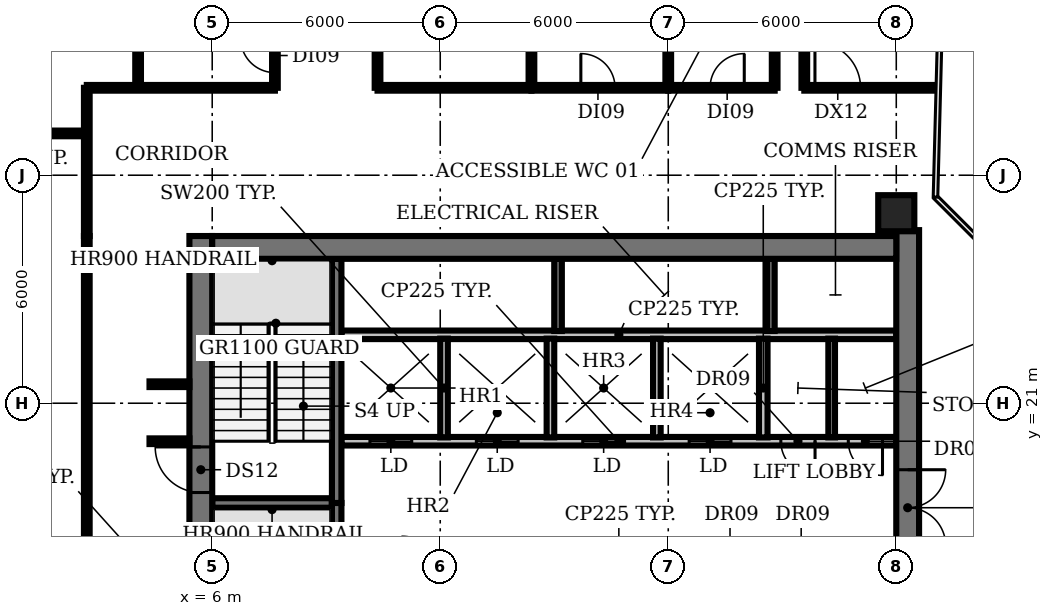
"""IFC4 building model, lengths in metres.
Left out: names, types, materials, properties, quantities, classifications, styles, units other than length and angle.
Written with IfcOpenShell. Run it as: python <this file> out.ifc"""

import sys

from ifc_helpers import new_model, si_unit, direction, frame, frame_2d, origin, origin_2d, place, context, subcontext, project, spatial, rectangle, circle, extrude, element, fill, save


model = new_model("IFC4")
c1 = context("Model", 3, precision=1e-05, world=origin(), true_north=direction((0.0, 1.0)))
c2 = subcontext(c1, "Body", "Model", "MODEL_VIEW")
j1 = project(units=[si_unit("LENGTHUNIT", "METRE"), si_unit("PLANEANGLEUNIT", "RADIAN")], contexts=[c1])
p1 = place(None, origin())
s1 = spatial("IfcSite", under=j1, at=p1, CompositionType="ELEMENT")
p2 = place(p1, origin())
s2 = spatial("IfcBuilding", under=s1, at=p2, CompositionType="ELEMENT")
p3 = place(p2, frame((0.0, 0.0, 163.4)))
s3 = spatial("IfcBuildingStorey", under=s2, at=p3, CompositionType="ELEMENT", Elevation=163.4)
p4 = place(p3, frame((24.0, 26.0, 0.0), z_axis=(0.0, 0.0, 1.0), x_axis=(1.0, 0.0, 0.0)))
e1 = element("IfcColumn", 1, at=p4, inside=s3, PredefinedType="COLUMN", context=c2, shape_type="SweptSolid", body=[
    extrude(circle(Radius=0.475, at=origin_2d()), origin(), (0.0, 0.0, 1.0), 3.85),
])
p5 = place(p3, frame((6.0, 18.375, 0.0), z_axis=(0.0, 0.0, 1.0), x_axis=(1.0, 0.0, 0.0)))
e2 = element("IfcWall", 2, at=p5, inside=s3, PredefinedType="SHEAR", context=c2, shape_type="SweptSolid", body=[
    extrude(rectangle(XDim=3.15, YDim=0.25, at=frame_2d((1.575, 0.0))), origin(), (0.0, 0.0, 1.0), 3.85),
])
p6 = place(p3, frame((24.0, 20.0, 0.0), z_axis=(0.0, 0.0, 1.0), x_axis=(-1.0, 0.0, 0.0)))
e3 = element("IfcWall", 3, at=p6, inside=s3, PredefinedType="PARTITIONING", context=c2, shape_type="SweptSolid", body=[
    extrude(rectangle(XDim=14.6, YDim=0.225, at=frame_2d((7.3, 0.0))), origin(), (0.0, 0.0, 1.0), 3.85),
])
p7 = place(p6, frame((12.75, 0.0, 0.0)))
e4 = element("IfcOpeningElement", 4, at=p7, cuts=e3, PredefinedType="OPENING", context=c2, shape_type="SweptSolid", body=[
    extrude(rectangle(XDim=1.1, YDim=2.1, at=frame_2d((0.55, 1.05))), frame((0.0, 0.123, 0.0), z_axis=(0.0, -1.0, 0.0), x_axis=(1.0, 0.0, 0.0)), (0.0, 0.0, 1.0), 0.245),
])
p8 = place(p6, frame((9.95, 0.0, 0.0)))
e5 = element("IfcOpeningElement", 5, at=p8, cuts=e3, PredefinedType="OPENING", context=c2, shape_type="SweptSolid", body=[
    extrude(rectangle(XDim=1.1, YDim=2.1, at=frame_2d((0.55, 1.05))), frame((0.0, 0.123, 0.0), z_axis=(0.0, -1.0, 0.0), x_axis=(1.0, 0.0, 0.0)), (0.0, 0.0, 1.0), 0.245),
])
p9 = place(p6, frame((7.15, 0.0, 0.0)))
e6 = element("IfcOpeningElement", 6, at=p9, cuts=e3, PredefinedType="OPENING", context=c2, shape_type="SweptSolid", body=[
    extrude(rectangle(XDim=1.1, YDim=2.1, at=frame_2d((0.55, 1.05))), frame((0.0, 0.123, 0.0), z_axis=(0.0, -1.0, 0.0), x_axis=(1.0, 0.0, 0.0)), (0.0, 0.0, 1.0), 0.245),
])
p10 = place(p6, frame((4.35, 0.0, 0.0)))
e7 = element("IfcOpeningElement", 7, at=p10, cuts=e3, PredefinedType="OPENING", context=c2, shape_type="SweptSolid", body=[
    extrude(rectangle(XDim=1.1, YDim=2.1, at=frame_2d((0.55, 1.05))), frame((0.0, 0.123, 0.0), z_axis=(0.0, -1.0, 0.0), x_axis=(1.0, 0.0, 0.0)), (0.0, 0.0, 1.0), 0.245),
])
p11 = place(p6, frame((2.137, 0.0, 0.0)))
e8 = element("IfcOpeningElement", 8, at=p11, cuts=e3, PredefinedType="OPENING", context=c2, shape_type="SweptSolid", body=[
    extrude(rectangle(XDim=0.9, YDim=2.1, at=frame_2d((0.45, 1.05))), frame((0.0, 0.123, 0.0), z_axis=(0.0, -1.0, 0.0), x_axis=(1.0, 0.0, 0.0)), (0.0, 0.0, 1.0), 0.245),
])
p12 = place(p6, frame((0.363, 0.0, 0.0)))
e9 = element("IfcOpeningElement", 9, at=p12, cuts=e3, PredefinedType="OPENING", context=c2, shape_type="SweptSolid", body=[
    extrude(rectangle(XDim=0.9, YDim=2.1, at=frame_2d((0.45, 1.05))), frame((0.0, 0.123, 0.0), z_axis=(0.0, -1.0, 0.0), x_axis=(1.0, 0.0, 0.0)), (0.0, 0.0, 1.0), 0.245),
])
p13 = place(p3, frame((9.4, 22.8, 0.0), z_axis=(0.0, 0.0, 1.0), x_axis=(1.0, 0.0, 0.0)))
e10 = element("IfcWall", 10, at=p13, inside=s3, PredefinedType="PARTITIONING", context=c2, shape_type="SweptSolid", body=[
    extrude(rectangle(XDim=14.6, YDim=0.225, at=frame_2d((7.3, 0.0))), origin(), (0.0, 0.0, 1.0), 3.85),
])
p14 = place(p3, frame((9.275, 18.375, 0.0), z_axis=(0.0, 0.0, 1.0), x_axis=(0.0, -1.0, 0.0)))
e11 = element("IfcWall", 11, at=p14, inside=s3, PredefinedType="SHEAR", context=c2, shape_type="SweptSolid", body=[
    extrude(rectangle(XDim=6.55, YDim=0.25, at=frame_2d((3.275, 0.0))), origin(), (0.0, 0.0, 1.0), 3.85),
])
p15 = place(p14, frame((5.075, 0.0, 0.0)))
e12 = element("IfcOpeningElement", 12, at=p15, cuts=e11, PredefinedType="OPENING", context=c2, shape_type="SweptSolid", body=[
    extrude(rectangle(XDim=1.0, YDim=2.1, at=frame_2d((0.5, 1.05))), frame((0.0, 0.135, 0.0), z_axis=(0.0, -1.0, 0.0), x_axis=(1.0, 0.0, 0.0)), (0.0, 0.0, 1.0), 0.27),
])
p16 = place(p3, frame((9.275, 18.375, 0.0), z_axis=(0.0, 0.0, 1.0), x_axis=(0.0, 1.0, 0.0)))
e13 = element("IfcWall", 13, at=p16, inside=s3, PredefinedType="SHEAR", context=c2, shape_type="SweptSolid", body=[
    extrude(rectangle(XDim=6.425, YDim=0.25, at=frame_2d((3.212, 0.0))), origin(), (0.0, 0.0, 1.0), 3.85),
])
for number, where, z_axis, x_axis in (
    (14, (12.1, 20.1, 0.0), (0.0, 0.0, 1.0), (0.0, 1.0, 0.0)),
    (15, (14.9, 20.1, 0.0), (0.0, 0.0, 1.0), (0.0, 1.0, 0.0)),
):
    element("IfcWall", number, at=place(p3, frame(where, z_axis=z_axis, x_axis=x_axis)), inside=s3, PredefinedType="SOLIDWALL", context=c2, shape_type="SweptSolid", body=[
        extrude(rectangle(XDim=2.6, YDim=0.2, at=frame_2d((1.3, 0.0))), origin(), (0.0, 0.0, 1.0), 3.85),
    ])
p17 = place(p3, frame((15.1, 22.9, 0.0), z_axis=(0.0, 0.0, 1.0), x_axis=(0.0, 1.0, 0.0)))
e16 = element("IfcWall", 16, at=p17, inside=s3, PredefinedType="SHEAR", context=c2, shape_type="SweptSolid", body=[
    extrude(rectangle(XDim=1.9, YDim=0.2, at=frame_2d((0.95, 0.0))), origin(), (0.0, 0.0, 1.0), 3.85),
])
p18 = place(p3, frame((17.7, 20.1, 0.0), z_axis=(0.0, 0.0, 1.0), x_axis=(0.0, 1.0, 0.0)))
e17 = element("IfcWall", 17, at=p18, inside=s3, PredefinedType="SOLIDWALL", context=c2, shape_type="SweptSolid", body=[
    extrude(rectangle(XDim=2.6, YDim=0.2, at=frame_2d((1.3, 0.0))), origin(), (0.0, 0.0, 1.0), 3.85),
])
p19 = place(p3, frame((20.5, 20.1, 0.0), z_axis=(0.0, 0.0, 1.0), x_axis=(0.0, 1.0, 0.0)))
e18 = element("IfcWall", 18, at=p19, inside=s3, PredefinedType="PARTITIONING", context=c2, shape_type="SweptSolid", body=[
    extrude(rectangle(XDim=2.6, YDim=0.225, at=frame_2d((1.3, 0.0))), origin(), (0.0, 0.0, 1.0), 3.85),
])
p20 = place(p3, frame((20.7, 22.9, 0.0), z_axis=(0.0, 0.0, 1.0), x_axis=(0.0, 1.0, 0.0)))
e19 = element("IfcWall", 19, at=p20, inside=s3, PredefinedType="SHEAR", context=c2, shape_type="SweptSolid", body=[
    extrude(rectangle(XDim=1.9, YDim=0.2, at=frame_2d((0.95, 0.0))), origin(), (0.0, 0.0, 1.0), 3.85),
])
p21 = place(p3, frame((22.3, 20.1, 0.0), z_axis=(0.0, 0.0, 1.0), x_axis=(0.0, 1.0, 0.0)))
e20 = element("IfcWall", 20, at=p21, inside=s3, PredefinedType="PARTITIONING", context=c2, shape_type="SweptSolid", body=[
    extrude(rectangle(XDim=2.6, YDim=0.175, at=frame_2d((1.3, 0.0))), origin(), (0.0, 0.0, 1.0), 3.85),
])
p22 = place(p3, frame((5.7, 4.8, 0.0), z_axis=(0.0, 0.0, 1.0), x_axis=(0.0, 1.0, 0.0)))
e21 = element("IfcWall", 21, at=p22, inside=s3, PredefinedType="SHEAR", context=c2, shape_type="SweptSolid", body=[
    extrude(rectangle(XDim=20.6, YDim=0.6, at=frame_2d((10.3, 0.0))), origin(), (0.0, 0.0, 1.0), 3.85),
])
p23 = place(p22, frame((0.85, 0.0, 0.0)))
e22 = element("IfcOpeningElement", 22, at=p23, cuts=e21, PredefinedType="OPENING", context=c2, shape_type="SweptSolid", body=[
    extrude(rectangle(XDim=1.5, YDim=2.1, at=frame_2d((0.75, 1.05))), frame((0.0, 0.31, 0.0), z_axis=(0.0, -1.0, 0.0), x_axis=(1.0, 0.0, 0.0)), (0.0, 0.0, 1.0), 0.62),
])
p24 = place(p22, frame((7.3, 0.0, 0.0)))
e23 = element("IfcOpeningElement", 23, at=p24, cuts=e21, PredefinedType="OPENING", context=c2, shape_type="SweptSolid", body=[
    extrude(rectangle(XDim=1.2, YDim=2.1, at=frame_2d((0.6, 1.05))), frame((0.0, 0.31, 0.0), z_axis=(0.0, -1.0, 0.0), x_axis=(1.0, 0.0, 0.0)), (0.0, 0.0, 1.0), 0.62),
])
p25 = place(p22, frame((13.85, 0.0, 0.0)))
e24 = element("IfcOpeningElement", 24, at=p25, cuts=e21, PredefinedType="OPENING", context=c2, shape_type="SweptSolid", body=[
    extrude(rectangle(XDim=1.2, YDim=2.1, at=frame_2d((0.6, 1.05))), frame((0.0, 0.31, 0.0), z_axis=(0.0, -1.0, 0.0), x_axis=(1.0, 0.0, 0.0)), (0.0, 0.0, 1.0), 0.62),
])
p26 = place(p3, frame((24.3, 25.555, 0.0), z_axis=(0.0, 0.0, 1.0), x_axis=(0.0, -1.0, 0.0)))
e25 = element("IfcWall", 25, at=p26, inside=s3, PredefinedType="SHEAR", context=c2, shape_type="SweptSolid", body=[
    extrude(rectangle(XDim=20.755, YDim=0.6, at=frame_2d((10.377, 0.0))), origin(), (0.0, 0.0, 1.0), 3.85),
])
p27 = place(p26, frame((18.405, 0.0, 0.0)))
e26 = element("IfcOpeningElement", 26, at=p27, cuts=e25, PredefinedType="OPENING", context=c2, shape_type="SweptSolid", body=[
    extrude(rectangle(XDim=1.5, YDim=2.1, at=frame_2d((0.75, 1.05))), frame((0.0, 0.31, 0.0), z_axis=(0.0, -1.0, 0.0), x_axis=(1.0, 0.0, 0.0)), (0.0, 0.0, 1.0), 0.62),
])
p28 = place(p26, frame((12.305, 0.0, 0.0)))
e27 = element("IfcOpeningElement", 27, at=p28, cuts=e25, PredefinedType="OPENING", context=c2, shape_type="SweptSolid", body=[
    extrude(rectangle(XDim=0.9, YDim=2.1, at=frame_2d((0.45, 1.05))), frame((0.0, 0.31, 0.0), z_axis=(0.0, -1.0, 0.0), x_axis=(1.0, 0.0, 0.0)), (0.0, 0.0, 1.0), 0.62),
])
p29 = place(p26, frame((6.305, 0.0, 0.0)))
e28 = element("IfcOpeningElement", 28, at=p29, cuts=e25, PredefinedType="OPENING", context=c2, shape_type="SweptSolid", body=[
    extrude(rectangle(XDim=2.0, YDim=2.1, at=frame_2d((1.0, 1.05))), frame((0.0, 0.31, 0.0), z_axis=(0.0, -1.0, 0.0), x_axis=(1.0, 0.0, 0.0)), (0.0, 0.0, 1.0), 0.62),
])
p30 = place(p3, frame((6.0, 25.1, 0.0), z_axis=(0.0, 0.0, 1.0), x_axis=(1.0, 0.0, 0.0)))
e29 = element("IfcWall", 29, at=p30, inside=s3, PredefinedType="SHEAR", context=c2, shape_type="SweptSolid", body=[
    extrude(rectangle(XDim=18.0, YDim=0.6, at=frame_2d((9.0, 0.0))), origin(), (0.0, 0.0, 1.0), 3.85),
])
p31 = place(p3, frame((-0.98, 28.1, 0.0), z_axis=(0.0, 0.0, 1.0), x_axis=(1.0, 0.0, 0.0)))
e30 = element("IfcWall", 30, at=p31, inside=s3, PredefinedType="PARTITIONING", context=c2, shape_type="SweptSolid", body=[
    extrude(rectangle(XDim=3.68, YDim=0.15, at=frame_2d((1.84, 0.0))), origin(), (0.0, 0.0, 1.0), 2.88),
])
p32 = place(p3, frame((2.7, 4.8, 0.0), z_axis=(0.0, 0.0, 1.0), x_axis=(0.0, 1.0, 0.0)))
e31 = element("IfcWall", 31, at=p32, inside=s3, PredefinedType="PARTITIONING", context=c2, shape_type="SweptSolid", body=[
    extrude(rectangle(XDim=20.6, YDim=0.15, at=frame_2d((10.3, 0.0))), origin(), (0.0, 0.0, 1.0), 2.88),
])
p33 = place(p32, frame((10.2, 0.0, 0.0)))
e32 = element("IfcOpeningElement", 32, at=p33, cuts=e31, PredefinedType="OPENING", context=c2, shape_type="SweptSolid", body=[
    extrude(rectangle(XDim=1.2, YDim=2.1, at=frame_2d((0.6, 1.05))), frame((0.0, 0.085, 0.0), z_axis=(0.0, -1.0, 0.0), x_axis=(1.0, 0.0, 0.0)), (0.0, 0.0, 1.0), 0.17),
])
p34 = place(p3, frame((2.7, 25.4, 0.0), z_axis=(0.0, 0.0, 1.0), x_axis=(0.0, 1.0, 0.0)))
e33 = element("IfcWall", 33, at=p34, inside=s3, PredefinedType="PARTITIONING", context=c2, shape_type="SweptSolid", body=[
    extrude(rectangle(XDim=3.9, YDim=0.15, at=frame_2d((1.95, 0.0))), origin(), (0.0, 0.0, 1.0), 2.88),
])
p35 = place(p3, frame((2.7, 29.3, 0.0), z_axis=(0.0, 0.0, 1.0), x_axis=(1.0, 0.0, 0.0)))
e34 = element("IfcWall", 34, at=p35, inside=s3, PredefinedType="PARTITIONING", context=c2, shape_type="SweptSolid", body=[
    extrude(rectangle(XDim=4.95, YDim=0.15, at=frame_2d((2.475, 0.0))), origin(), (0.0, 0.0, 1.0), 2.88),
])
p36 = place(p3, frame((4.05, 29.3, 0.0), z_axis=(0.0, 0.0, 1.0), x_axis=(0.0, 1.0, 0.0)))
e35 = element("IfcWall", 35, at=p36, inside=s3, PredefinedType="PARTITIONING", context=c2, shape_type="SweptSolid", body=[
    extrude(rectangle(XDim=4.8, YDim=0.15, at=frame_2d((2.4, 0.0))), origin(), (0.0, 0.0, 1.0), 2.88),
])
for number, where, z_axis, x_axis in (
    (36, (4.35, 20.0, 0.0), (0.0, 0.0, 1.0), (1.0, 0.0, 0.0)),
    (37, (4.35, 21.5, 0.0), (0.0, 0.0, 1.0), (1.0, 0.0, 0.0)),
):
    element("IfcWall", number, at=place(p3, frame(where, z_axis=z_axis, x_axis=x_axis)), inside=s3, PredefinedType="PARTITIONING", context=c2, shape_type="SweptSolid", body=[
        extrude(rectangle(XDim=1.05, YDim=0.15, at=frame_2d((0.525, 0.0))), origin(), (0.0, 0.0, 1.0), 2.88),
    ])
p37 = place(p3, frame((7.65, 29.3, 0.0), z_axis=(0.0, 0.0, 1.0), x_axis=(0.0, 1.0, 0.0)))
e38 = element("IfcWall", 38, at=p37, inside=s3, PredefinedType="PARTITIONING", context=c2, shape_type="SweptSolid", body=[
    extrude(rectangle(XDim=4.8, YDim=0.15, at=frame_2d((2.4, 0.0))), origin(), (0.0, 0.0, 1.0), 2.88),
])
p38 = place(p37, frame((0.4, 0.0, 0.0)))
e39 = element("IfcOpeningElement", 39, at=p38, cuts=e38, PredefinedType="OPENING", context=c2, shape_type="SweptSolid", body=[
    extrude(rectangle(XDim=0.9, YDim=2.1, at=frame_2d((0.45, 1.05))), frame((0.0, 0.085, 0.0), z_axis=(0.0, -1.0, 0.0), x_axis=(1.0, 0.0, 0.0)), (0.0, 0.0, 1.0), 0.17),
])
p39 = place(p3, frame((10.35, 29.3, 0.0), z_axis=(0.0, 0.0, 1.0), x_axis=(0.0, 1.0, 0.0)))
e40 = element("IfcWall", 40, at=p39, inside=s3, PredefinedType="PARTITIONING", context=c2, shape_type="SweptSolid", body=[
    extrude(rectangle(XDim=4.8, YDim=0.15, at=frame_2d((2.4, 0.0))), origin(), (0.0, 0.0, 1.0), 2.88),
])
p40 = place(p3, frame((10.35, 29.3, 0.0), z_axis=(0.0, 0.0, 1.0), x_axis=(1.0, 0.0, 0.0)))
e41 = element("IfcWall", 41, at=p40, inside=s3, PredefinedType="PARTITIONING", context=c2, shape_type="SweptSolid", body=[
    extrude(rectangle(XDim=4.05, YDim=0.15, at=frame_2d((2.025, 0.0))), origin(), (0.0, 0.0, 1.0), 2.88),
])
p41 = place(p3, frame((14.4, 29.3, 0.0), z_axis=(0.0, 0.0, 1.0), x_axis=(0.0, 1.0, 0.0)))
e42 = element("IfcWall", 42, at=p41, inside=s3, PredefinedType="PARTITIONING", context=c2, shape_type="SweptSolid", body=[
    extrude(rectangle(XDim=4.8, YDim=0.15, at=frame_2d((2.4, 0.0))), origin(), (0.0, 0.0, 1.0), 2.88),
])
p42 = place(p3, frame((14.4, 29.3, 0.0), z_axis=(0.0, 0.0, 1.0), x_axis=(1.0, 0.0, 0.0)))
e43 = element("IfcWall", 43, at=p42, inside=s3, PredefinedType="PARTITIONING", context=c2, shape_type="SweptSolid", body=[
    extrude(rectangle(XDim=3.6, YDim=0.15, at=frame_2d((1.8, 0.0))), origin(), (0.0, 0.0, 1.0), 2.88),
])
p43 = place(p42, frame((1.3, 0.0, 0.0)))
e44 = element("IfcOpeningElement", 44, at=p43, cuts=e43, PredefinedType="OPENING", context=c2, shape_type="SweptSolid", body=[
    extrude(rectangle(XDim=0.9, YDim=2.1, at=frame_2d((0.45, 1.05))), frame((0.0, 0.085, 0.0), z_axis=(0.0, -1.0, 0.0), x_axis=(1.0, 0.0, 0.0)), (0.0, 0.0, 1.0), 0.17),
])
p44 = place(p3, frame((18.0, 29.3, 0.0), z_axis=(0.0, 0.0, 1.0), x_axis=(0.0, 1.0, 0.0)))
e45 = element("IfcWall", 45, at=p44, inside=s3, PredefinedType="PARTITIONING", context=c2, shape_type="SweptSolid", body=[
    extrude(rectangle(XDim=4.8, YDim=0.15, at=frame_2d((2.4, 0.0))), origin(), (0.0, 0.0, 1.0), 2.88),
])
p45 = place(p3, frame((18.0, 29.3, 0.0), z_axis=(0.0, 0.0, 1.0), x_axis=(1.0, 0.0, 0.0)))
e46 = element("IfcWall", 46, at=p45, inside=s3, PredefinedType="PARTITIONING", context=c2, shape_type="SweptSolid", body=[
    extrude(rectangle(XDim=2.8, YDim=0.15, at=frame_2d((1.4, 0.0))), origin(), (0.0, 0.0, 1.0), 2.88),
])
p46 = place(p45, frame((1.1, 0.0, 0.0)))
e47 = element("IfcOpeningElement", 47, at=p46, cuts=e46, PredefinedType="OPENING", context=c2, shape_type="SweptSolid", body=[
    extrude(rectangle(XDim=0.9, YDim=2.1, at=frame_2d((0.45, 1.05))), frame((0.0, 0.085, 0.0), z_axis=(0.0, -1.0, 0.0), x_axis=(1.0, 0.0, 0.0)), (0.0, 0.0, 1.0), 0.17),
])
for number, where, z_axis, x_axis in (
    (48, (20.8, 29.3, 0.0), (0.0, 0.0, 1.0), (0.0, 1.0, 0.0)),
    (49, (21.58, 29.3, 0.0), (0.0, 0.0, 1.0), (0.0, 1.0, 0.0)),
):
    element("IfcWall", number, at=place(p3, frame(where, z_axis=z_axis, x_axis=x_axis)), inside=s3, PredefinedType="PARTITIONING", context=c2, shape_type="SweptSolid", body=[
        extrude(rectangle(XDim=4.8, YDim=0.15, at=frame_2d((2.4, 0.0))), origin(), (0.0, 0.0, 1.0), 2.88),
    ])
p47 = place(p3, frame((21.58, 29.3, 0.0), z_axis=(0.0, 0.0, 1.0), x_axis=(1.0, 0.0, 0.0)))
e50 = element("IfcWall", 50, at=p47, inside=s3, PredefinedType="PARTITIONING", context=c2, shape_type="SweptSolid", body=[
    extrude(rectangle(XDim=3.48, YDim=0.15, at=frame_2d((1.74, 0.0))), origin(), (0.0, 0.0, 1.0), 2.88),
])
p48 = place(p47, frame((0.28, 0.0, 0.0)))
e51 = element("IfcOpeningElement", 51, at=p48, cuts=e50, PredefinedType="OPENING", context=c2, shape_type="SweptSolid", body=[
    extrude(rectangle(XDim=1.2, YDim=2.1, at=frame_2d((0.6, 1.05))), frame((0.0, 0.085, 0.0), z_axis=(0.0, -1.0, 0.0), x_axis=(1.0, 0.0, 0.0)), (0.0, 0.0, 1.0), 0.17),
])
p49 = place(p7, origin())
e52 = element("IfcDoor", 52, at=p49, inside=s3, OperationType="DOUBLE_DOOR_SLIDING", PredefinedType="DOOR", context=c2, shape_type="SweptSolid", body=[
    extrude(rectangle(XDim=1.1, YDim=2.1, at=frame_2d((0.55, 1.05))), frame((0.0, 0.025, 0.0), z_axis=(0.0, -1.0, 0.0), x_axis=(1.0, 0.0, 0.0)), (0.0, 0.0, 1.0), 0.05),
])
fill(e4, e52)
p50 = place(p8, origin())
e53 = element("IfcDoor", 53, at=p50, inside=s3, OperationType="DOUBLE_DOOR_SLIDING", PredefinedType="DOOR", context=c2, shape_type="SweptSolid", body=[
    extrude(rectangle(XDim=1.1, YDim=2.1, at=frame_2d((0.55, 1.05))), frame((0.0, 0.025, 0.0), z_axis=(0.0, -1.0, 0.0), x_axis=(1.0, 0.0, 0.0)), (0.0, 0.0, 1.0), 0.05),
])
fill(e5, e53)
p51 = place(p9, origin())
e54 = element("IfcDoor", 54, at=p51, inside=s3, OperationType="DOUBLE_DOOR_SLIDING", PredefinedType="DOOR", context=c2, shape_type="SweptSolid", body=[
    extrude(rectangle(XDim=1.1, YDim=2.1, at=frame_2d((0.55, 1.05))), frame((0.0, 0.025, 0.0), z_axis=(0.0, -1.0, 0.0), x_axis=(1.0, 0.0, 0.0)), (0.0, 0.0, 1.0), 0.05),
])
fill(e6, e54)
p52 = place(p10, origin())
e55 = element("IfcDoor", 55, at=p52, inside=s3, OperationType="DOUBLE_DOOR_SLIDING", PredefinedType="DOOR", context=c2, shape_type="SweptSolid", body=[
    extrude(rectangle(XDim=1.1, YDim=2.1, at=frame_2d((0.55, 1.05))), frame((0.0, 0.025, 0.0), z_axis=(0.0, -1.0, 0.0), x_axis=(1.0, 0.0, 0.0)), (0.0, 0.0, 1.0), 0.05),
])
fill(e7, e55)
p53 = place(p11, origin())
e56 = element("IfcDoor", 56, at=p53, inside=s3, OperationType="SINGLE_SWING_LEFT", PredefinedType="DOOR", context=c2, shape_type="SweptSolid", body=[
    extrude(rectangle(XDim=0.9, YDim=2.1, at=frame_2d((0.45, 1.05))), frame((0.0, 0.025, 0.0), z_axis=(0.0, -1.0, 0.0), x_axis=(1.0, 0.0, 0.0)), (0.0, 0.0, 1.0), 0.05),
])
fill(e8, e56)
p54 = place(p12, origin())
e57 = element("IfcDoor", 57, at=p54, inside=s3, OperationType="SINGLE_SWING_LEFT", PredefinedType="DOOR", context=c2, shape_type="SweptSolid", body=[
    extrude(rectangle(XDim=0.9, YDim=2.1, at=frame_2d((0.45, 1.05))), frame((0.0, 0.025, 0.0), z_axis=(0.0, -1.0, 0.0), x_axis=(1.0, 0.0, 0.0)), (0.0, 0.0, 1.0), 0.05),
])
fill(e9, e57)
p55 = place(p25, origin())
e58 = element("IfcDoor", 58, at=p55, inside=s3, OperationType="SINGLE_SWING_RIGHT", PredefinedType="DOOR", context=c2, shape_type="SweptSolid", body=[
    extrude(rectangle(XDim=1.2, YDim=2.1, at=frame_2d((0.6, 1.05))), frame((0.0, 0.025, 0.0), z_axis=(0.0, -1.0, 0.0), x_axis=(1.0, 0.0, 0.0)), (0.0, 0.0, 1.0), 0.05),
])
fill(e24, e58)
p56 = place(p29, origin())
e59 = element("IfcDoor", 59, at=p56, inside=s3, OperationType="DOUBLE_DOOR_SINGLE_SWING", PredefinedType="DOOR", context=c2, shape_type="SweptSolid", body=[
    extrude(rectangle(XDim=2.0, YDim=2.1, at=frame_2d((1.0, 1.05))), frame((0.0, 0.025, 0.0), z_axis=(0.0, -1.0, 0.0), x_axis=(1.0, 0.0, 0.0)), (0.0, 0.0, 1.0), 0.05),
])
fill(e28, e59)
p57 = place(p38, origin())
e60 = element("IfcDoor", 60, at=p57, inside=s3, OperationType="SINGLE_SWING_RIGHT", PredefinedType="DOOR", context=c2, shape_type="SweptSolid", body=[
    extrude(rectangle(XDim=0.9, YDim=2.1, at=frame_2d((0.45, 1.05))), frame((0.0, 0.025, 0.0), z_axis=(0.0, -1.0, 0.0), x_axis=(1.0, 0.0, 0.0)), (0.0, 0.0, 1.0), 0.05),
])
fill(e39, e60)
p58 = place(p43, origin())
e61 = element("IfcDoor", 61, at=p58, inside=s3, OperationType="SINGLE_SWING_LEFT", PredefinedType="DOOR", context=c2, shape_type="SweptSolid", body=[
    extrude(rectangle(XDim=0.9, YDim=2.1, at=frame_2d((0.45, 1.05))), frame((0.0, 0.025, 0.0), z_axis=(0.0, -1.0, 0.0), x_axis=(1.0, 0.0, 0.0)), (0.0, 0.0, 1.0), 0.05),
])
fill(e44, e61)
p59 = place(p46, origin())
e62 = element("IfcDoor", 62, at=p59, inside=s3, OperationType="SINGLE_SWING_RIGHT", PredefinedType="DOOR", context=c2, shape_type="SweptSolid", body=[
    extrude(rectangle(XDim=0.9, YDim=2.1, at=frame_2d((0.45, 1.05))), frame((0.0, 0.025, 0.0), z_axis=(0.0, -1.0, 0.0), x_axis=(1.0, 0.0, 0.0)), (0.0, 0.0, 1.0), 0.05),
])
fill(e47, e62)
p60 = place(p48, origin())
e63 = element("IfcDoor", 63, at=p60, inside=s3, OperationType="SINGLE_SWING_LEFT", PredefinedType="DOOR", context=c2, shape_type="SweptSolid", body=[
    extrude(rectangle(XDim=1.2, YDim=2.1, at=frame_2d((0.6, 1.05))), frame((0.0, 0.025, 0.0), z_axis=(0.0, -1.0, 0.0), x_axis=(1.0, 0.0, 0.0)), (0.0, 0.0, 1.0), 0.05),
])
fill(e51, e63)
save(model, sys.argv[1])
